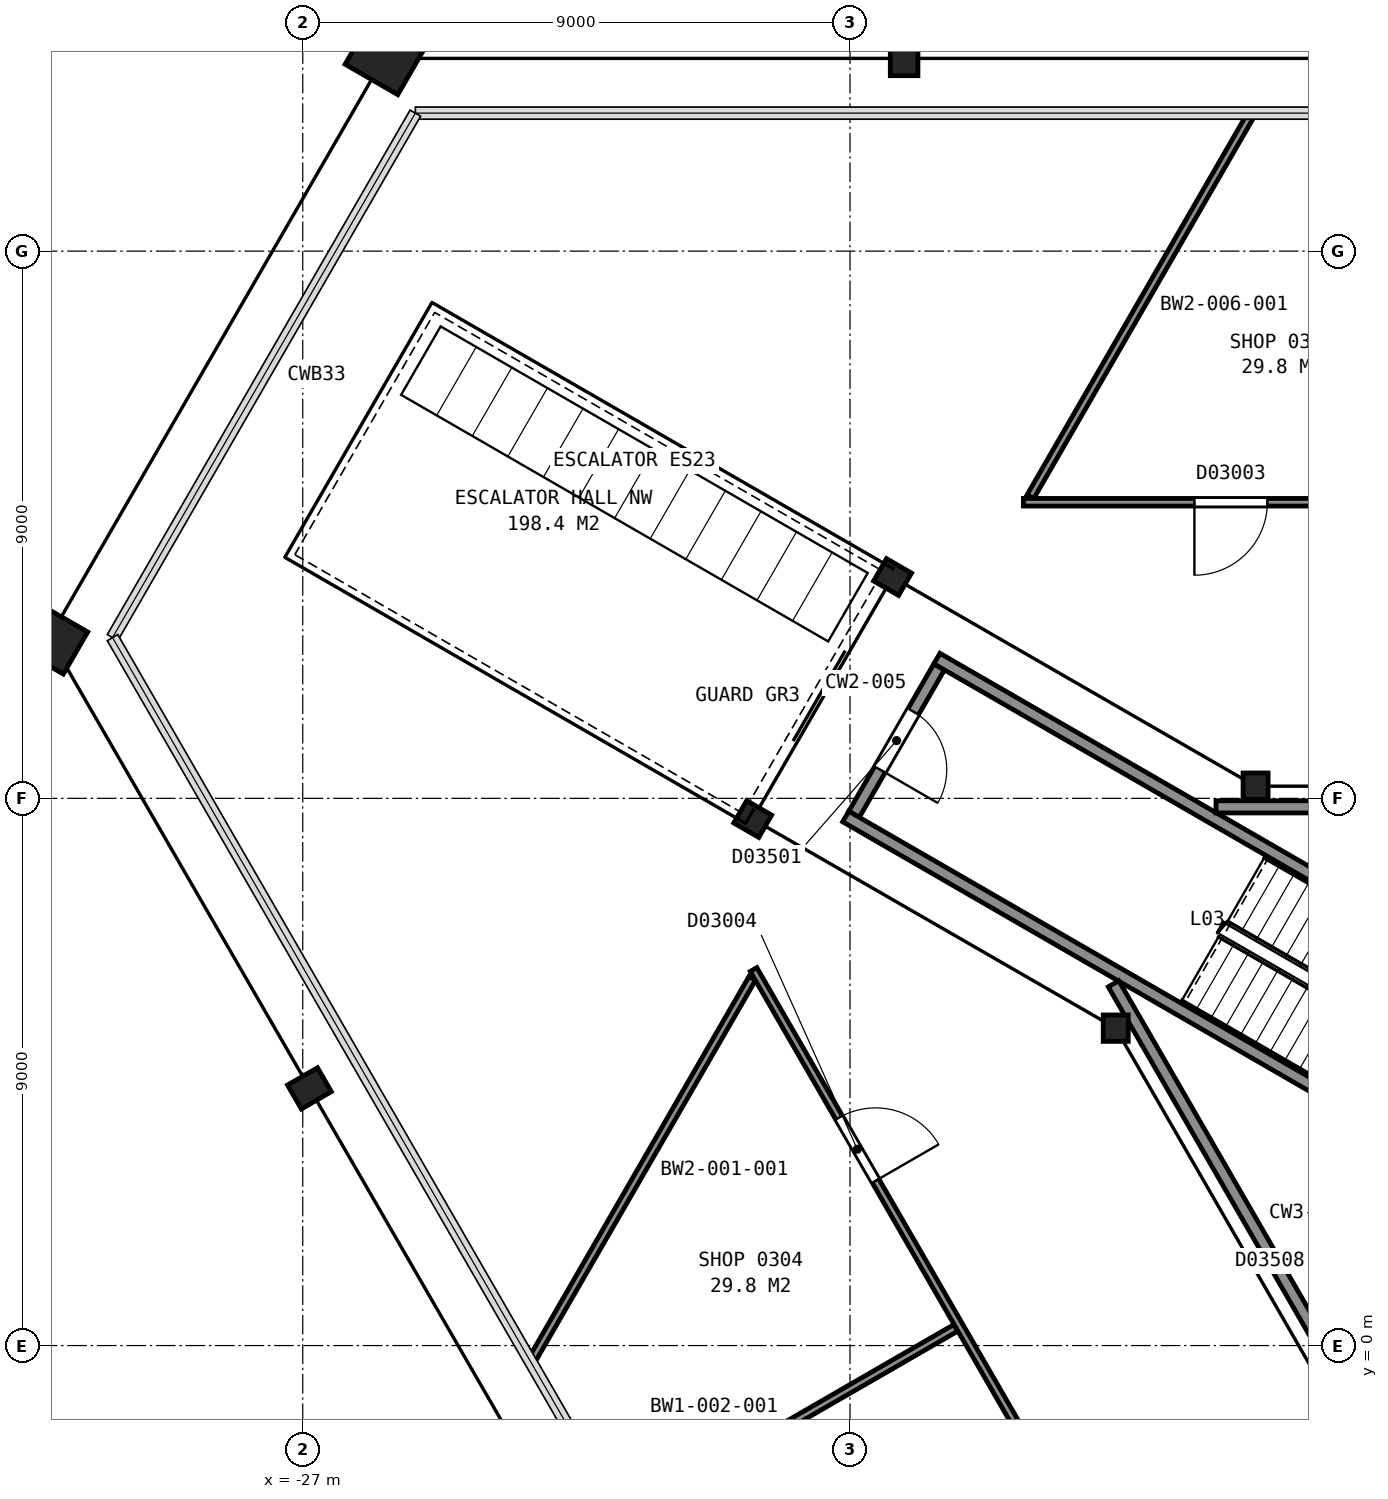
"""IFC4 building model, lengths in metres.
Left out: names, types, materials, properties, quantities, classifications, styles, units other than length and angle.
Written with IfcOpenShell. Run it as: python <this file> out.ifc"""

import sys

from ifc_helpers import new_model, si_unit, direction, frame, frame_2d, origin, origin_2d, place, context, subcontext, project, spatial, rectangle, hollow_rectangle, i_section, extrude, element, fill, save


model = new_model("IFC4")
c1 = context("Model", 3, precision=1e-05, world=origin(), true_north=direction((0.0, 1.0)))
c2 = subcontext(c1, "Body", "Model", "MODEL_VIEW")
j1 = project(units=[si_unit("LENGTHUNIT", "METRE"), si_unit("PLANEANGLEUNIT", "RADIAN")], contexts=[c1])
p1 = place(None, origin())
s1 = spatial("IfcSite", under=j1, at=p1, CompositionType="ELEMENT")
p2 = place(p1, origin())
s2 = spatial("IfcBuilding", under=s1, at=p2, CompositionType="ELEMENT")
p3 = place(p2, frame((0.0, 0.0, 22.4)))
s3 = spatial("IfcBuildingStorey", under=s2, at=p3, CompositionType="ELEMENT", Elevation=22.4)
p4 = place(p3, frame((-17.11, 21.17, 0.0), z_axis=(0.0, 0.0, 1.0), x_axis=(1.0, 0.0, 0.0)))
e1 = element("IfcColumn", 1, at=p4, inside=s3, PredefinedType="COLUMN", context=c2, shape_type="SweptSolid", body=[
    extrude(i_section(OverallWidth=0.455, OverallDepth=0.569, WebThickness=0.078, FlangeThickness=0.125, FilletRadius=0.015, at=origin_2d()), origin(), (0.0, 0.0, 1.0), 4.8),
])
for number, where, z_axis, x_axis in (
    (2, (-25.67, 21.17, 0.0), (0.0, 0.0, 1.0), (0.5, 0.866, 0.0)),
    (3, (-31.17, 11.64, 0.0), (0.0, 0.0, 1.0), (0.5, 0.866, 0.0)),
):
    element("IfcColumn", number, at=place(p3, frame(where, z_axis=z_axis, x_axis=x_axis)), inside=s3, PredefinedType="COLUMN", context=c2, shape_type="SweptSolid", body=[
        extrude(hollow_rectangle(XDim=0.8, YDim=1.0, WallThickness=0.075, at=origin_2d()), origin(), (0.0, 0.0, 1.0), 4.8),
    ])
p5 = place(p3, frame((-26.89, 4.23, 0.0), z_axis=(0.0, 0.0, 1.0), x_axis=(-0.5, 0.866025403784, 0.0)))
e4 = element("IfcColumn", 4, at=p5, inside=s3, PredefinedType="COLUMN", context=c2, shape_type="SweptSolid", body=[
    extrude(i_section(OverallWidth=0.455, OverallDepth=0.569, WebThickness=0.078, FlangeThickness=0.125, FilletRadius=0.015, at=origin_2d()), origin(), (0.0, 0.0, 1.0), 4.8),
])
p6 = place(p3, frame((-11.33, 9.2, 0.0), z_axis=(0.0, 0.0, 1.0), x_axis=(1.0, 0.0, 0.0)))
e5 = element("IfcColumn", 5, at=p6, inside=s3, PredefinedType="COLUMN", context=c2, shape_type="SweptSolid", body=[
    extrude(i_section(OverallWidth=0.411, OverallDepth=0.434, WebThickness=0.036, FlangeThickness=0.057, FilletRadius=0.015, at=origin_2d()), origin(), (0.0, 0.0, 1.0), 4.8),
])
for number, where, z_axis, x_axis in (
    (6, (-17.3, 12.64, 0.0), (0.0, 0.0, 1.0), (0.5, 0.866, 0.0)),
    (7, (-19.6, 8.66, 0.0), (0.0, 0.0, 1.0), (0.5, 0.866, 0.0)),
):
    element("IfcColumn", number, at=place(p3, frame(where, z_axis=z_axis, x_axis=x_axis)), inside=s3, PredefinedType="COLUMN", context=c2, shape_type="SweptSolid", body=[
        extrude(i_section(OverallWidth=0.424, OverallDepth=0.475, WebThickness=0.048, FlangeThickness=0.077, FilletRadius=0.015, at=origin_2d()), origin(), (0.0, 0.0, 1.0), 4.8),
    ])
p7 = place(p3, frame((-13.63, 5.22, 0.0), z_axis=(0.0, 0.0, 1.0), x_axis=(1.0, 0.0, 0.0)))
e8 = element("IfcColumn", 8, at=p7, inside=s3, PredefinedType="COLUMN", context=c2, shape_type="SweptSolid", body=[
    extrude(i_section(OverallWidth=0.411, OverallDepth=0.434, WebThickness=0.036, FlangeThickness=0.057, FilletRadius=0.015, at=origin_2d()), origin(), (0.0, 0.0, 1.0), 4.8),
])
p8 = place(p3, frame((-16.534, 11.162, 0.0), z_axis=(0.0, 0.0, 1.0), x_axis=(-0.49998411664, -0.866034573852, 0.0)))
e9 = element("IfcWall", 9, at=p8, inside=s3, PredefinedType="PARTITIONING", context=c2, shape_type="SweptSolid", body=[
    extrude(rectangle(XDim=2.8, YDim=0.2, at=frame_2d((1.4, 0.0))), origin(), (0.0, 0.0, 1.0), 4.55),
])
p9 = place(p8, frame((0.85, 0.0, 0.0)))
e10 = element("IfcOpeningElement", 10, at=p9, cuts=e9, PredefinedType="OPENING", context=c2, shape_type="SweptSolid", body=[
    extrude(rectangle(XDim=1.1, YDim=2.1, at=frame_2d((0.55, 1.05))), frame((0.0, 0.11, 0.0), z_axis=(0.0, -1.0, 0.0), x_axis=(1.0, 0.0, 0.0)), (0.0, 0.0, 1.0), 0.22),
])
for number, where, z_axis, x_axis in (
    (11, (-7.678, 2.701, 0.0), (0.0, 0.0, 1.0), (-0.866, 0.5, 0.0)),
    (12, (-6.178, 5.299, 0.0), (0.0, 0.0, 1.0), (-0.866, 0.5, 0.0)),
):
    element("IfcWall", number, at=place(p3, frame(where, z_axis=z_axis, x_axis=x_axis)), inside=s3, PredefinedType="PARTITIONING", context=c2, shape_type="SweptSolid", body=[
        extrude(rectangle(XDim=12.0, YDim=0.2, at=frame_2d((6.0, 0.0))), origin(), (0.0, 0.0, 1.0), 4.55),
    ])
p10 = place(p3, frame((-13.666, 5.95, 0.0), z_axis=(0.0, 0.0, 1.0), x_axis=(0.499971736997, -0.866041720822, 0.0)))
e13 = element("IfcWall", 13, at=p10, inside=s3, PredefinedType="PARTITIONING", context=c2, shape_type="SweptSolid", body=[
    extrude(rectangle(XDim=14.949, YDim=0.2, at=frame_2d((7.475, 0.0))), origin(), (0.0, 0.0, 1.0), 4.55),
])
p11 = place(p10, frame((8.69, 0.0, 0.0)))
e14 = element("IfcOpeningElement", 14, at=p11, cuts=e13, PredefinedType="OPENING", context=c2, shape_type="SweptSolid", body=[
    extrude(rectangle(XDim=1.8, YDim=2.1, at=frame_2d((0.9, 1.05))), frame((0.0, 0.11, 0.0), z_axis=(0.0, -1.0, 0.0), x_axis=(1.0, 0.0, 0.0)), (0.0, 0.0, 1.0), 0.22),
])
p12 = place(p3, frame((11.986, 8.86, 0.0), z_axis=(0.0, 0.0, 1.0), x_axis=(-1.0, 0.0, 0.0)))
e15 = element("IfcWall", 15, at=p12, inside=s3, PredefinedType="PARTITIONING", context=c2, shape_type="SweptSolid", body=[
    extrude(rectangle(XDim=23.967, YDim=0.2, at=frame_2d((11.983, 0.0))), origin(), (0.0, 0.0, 1.0), 4.55),
])
p13 = place(p12, frame((7.596, 0.0, 0.0)))
e16 = element("IfcOpeningElement", 16, at=p13, cuts=e15, PredefinedType="OPENING", context=c2, shape_type="SweptSolid", body=[
    extrude(rectangle(XDim=1.8, YDim=2.1, at=frame_2d((0.9, 1.05))), frame((0.0, 0.11, 0.0), z_axis=(0.0, -1.0, 0.0), x_axis=(1.0, 0.0, 0.0)), (0.0, 0.0, 1.0), 0.22),
])
p14 = place(p3, frame((-23.25, -0.27, 0.0), z_axis=(0.0, 0.0, 1.0), x_axis=(0.500002873931, 0.866023744513, 0.0)))
e17 = element("IfcWall", 17, at=p14, inside=s3, PredefinedType="PARTITIONING", context=c2, shape_type="SweptSolid", body=[
    extrude(rectangle(XDim=7.285, YDim=0.125, at=frame_2d((3.643, 0.0))), origin(), (0.0, 0.0, 1.0), 4.64),
])
p15 = place(p3, frame((-21.746, -2.875, 0.0), z_axis=(0.0, 0.0, 1.0), x_axis=(0.866118237319, 0.499839173118, 0.0)))
e18 = element("IfcWall", 18, at=p15, inside=s3, PredefinedType="PARTITIONING", context=c2, shape_type="SweptSolid", body=[
    extrude(rectangle(XDim=6.337, YDim=0.125, at=frame_2d((3.169, 0.0))), origin(), (0.0, 0.0, 1.0), 3.653),
])
p16 = place(p3, frame((-4.438, -20.054, 0.0), z_axis=(0.0, 0.0, 1.0), x_axis=(-0.499994028088, 0.866028851642, 0.0)))
e19 = element("IfcWall", 19, at=p16, inside=s3, PredefinedType="PARTITIONING", context=c2, shape_type="SweptSolid", body=[
    extrude(rectangle(XDim=30.297, YDim=0.125, at=frame_2d((15.148, 0.0))), origin(), (0.0, 0.0, 1.0), 3.653),
])
p17 = place(p16, frame((26.285, 0.0, 0.0)))
e20 = element("IfcOpeningElement", 20, at=p17, cuts=e19, PredefinedType="OPENING", context=c2, shape_type="SweptSolid", body=[
    extrude(rectangle(XDim=1.2, YDim=2.1, at=frame_2d((0.6, 1.05))), frame((0.0, 0.073, 0.0), z_axis=(0.0, -1.0, 0.0), x_axis=(1.0, 0.0, 0.0)), (0.0, 0.0, 1.0), 0.145),
])
p18 = place(p16, frame((18.731, 0.0, 0.0)))
e21 = element("IfcOpeningElement", 21, at=p18, cuts=e19, PredefinedType="OPENING", context=c2, shape_type="SweptSolid", body=[
    extrude(rectangle(XDim=1.2, YDim=2.1, at=frame_2d((0.6, 1.05))), frame((0.0, 0.073, 0.0), z_axis=(0.0, -1.0, 0.0), x_axis=(1.0, 0.0, 0.0)), (0.0, 0.0, 1.0), 0.145),
])
p19 = place(p16, frame((10.449, 0.0, 0.0)))
e22 = element("IfcOpeningElement", 22, at=p19, cuts=e19, PredefinedType="OPENING", context=c2, shape_type="SweptSolid", body=[
    extrude(rectangle(XDim=1.0, YDim=2.1, at=frame_2d((0.5, 1.05))), frame((0.0, 0.073, 0.0), z_axis=(0.0, -1.0, 0.0), x_axis=(1.0, 0.0, 0.0)), (0.0, 0.0, 1.0), 0.145),
])
p20 = place(p16, frame((2.816, 0.0, 0.0)))
e23 = element("IfcOpeningElement", 23, at=p20, cuts=e19, PredefinedType="OPENING", context=c2, shape_type="SweptSolid", body=[
    extrude(rectangle(XDim=1.2, YDim=2.1, at=frame_2d((0.6, 1.05))), frame((0.0, 0.073, 0.0), z_axis=(0.0, -1.0, 0.0), x_axis=(1.0, 0.0, 0.0)), (0.0, 0.0, 1.0), 0.145),
])
p21 = place(p3, frame((-15.033, 13.961, 0.0), z_axis=(0.0, 0.0, 1.0), x_axis=(0.499977739203, 0.86603825568, 0.0)))
e24 = element("IfcWall", 24, at=p21, inside=s3, PredefinedType="PARTITIONING", context=c2, shape_type="SweptSolid", body=[
    extrude(rectangle(XDim=7.285, YDim=0.125, at=frame_2d((3.643, 0.0))), origin(), (0.0, 0.0, 1.0), 4.64),
])
p22 = place(p3, frame((-15.148, 13.87, 0.0), z_axis=(0.0, 0.0, 1.0), x_axis=(1.0, 0.0, 0.0)))
e25 = element("IfcWall", 25, at=p22, inside=s3, PredefinedType="PARTITIONING", context=c2, shape_type="SweptSolid", body=[
    extrude(rectangle(XDim=30.297, YDim=0.125, at=frame_2d((15.148, 0.0))), origin(), (0.0, 0.0, 1.0), 3.653),
])
p23 = place(p22, frame((10.466, 0.0, 0.0)))
e26 = element("IfcOpeningElement", 26, at=p23, cuts=e25, PredefinedType="OPENING", context=c2, shape_type="SweptSolid", body=[
    extrude(rectangle(XDim=1.0, YDim=2.1, at=frame_2d((0.5, 1.05))), frame((0.0, 0.073, 0.0), z_axis=(0.0, -1.0, 0.0), x_axis=(1.0, 0.0, 0.0)), (0.0, 0.0, 1.0), 0.145),
])
p24 = place(p22, frame((2.812, 0.0, 0.0)))
e27 = element("IfcOpeningElement", 27, at=p24, cuts=e25, PredefinedType="OPENING", context=c2, shape_type="SweptSolid", body=[
    extrude(rectangle(XDim=1.2, YDim=2.1, at=frame_2d((0.6, 1.05))), frame((0.0, 0.073, 0.0), z_axis=(0.0, -1.0, 0.0), x_axis=(1.0, 0.0, 0.0)), (0.0, 0.0, 1.0), 0.145),
])
p25 = place(p9, origin())
e28 = element("IfcDoor", 28, at=p25, inside=s3, OperationType="SINGLE_SWING_RIGHT", PredefinedType="DOOR", context=c2, shape_type="SweptSolid", body=[
    extrude(rectangle(XDim=1.1, YDim=2.1, at=frame_2d((0.55, 1.05))), frame((0.0, 0.025, 0.0), z_axis=(0.0, -1.0, 0.0), x_axis=(1.0, 0.0, 0.0)), (0.0, 0.0, 1.0), 0.05),
])
fill(e10, e28)
p26 = place(p17, origin())
e29 = element("IfcDoor", 29, at=p26, inside=s3, OperationType="SINGLE_SWING_LEFT", PredefinedType="DOOR", context=c2, shape_type="SweptSolid", body=[
    extrude(rectangle(XDim=1.2, YDim=2.1, at=frame_2d((0.6, 1.05))), frame((0.0, 0.025, 0.0), z_axis=(0.0, -1.0, 0.0), x_axis=(1.0, 0.0, 0.0)), (0.0, 0.0, 1.0), 0.05),
])
fill(e20, e29)
p27 = place(p24, origin())
e30 = element("IfcDoor", 30, at=p27, inside=s3, OperationType="SINGLE_SWING_LEFT", PredefinedType="DOOR", context=c2, shape_type="SweptSolid", body=[
    extrude(rectangle(XDim=1.2, YDim=2.1, at=frame_2d((0.6, 1.05))), frame((0.0, 0.025, 0.0), z_axis=(0.0, -1.0, 0.0), x_axis=(1.0, 0.0, 0.0)), (0.0, 0.0, 1.0), 0.05),
])
fill(e27, e30)
save(model, sys.argv[1])
